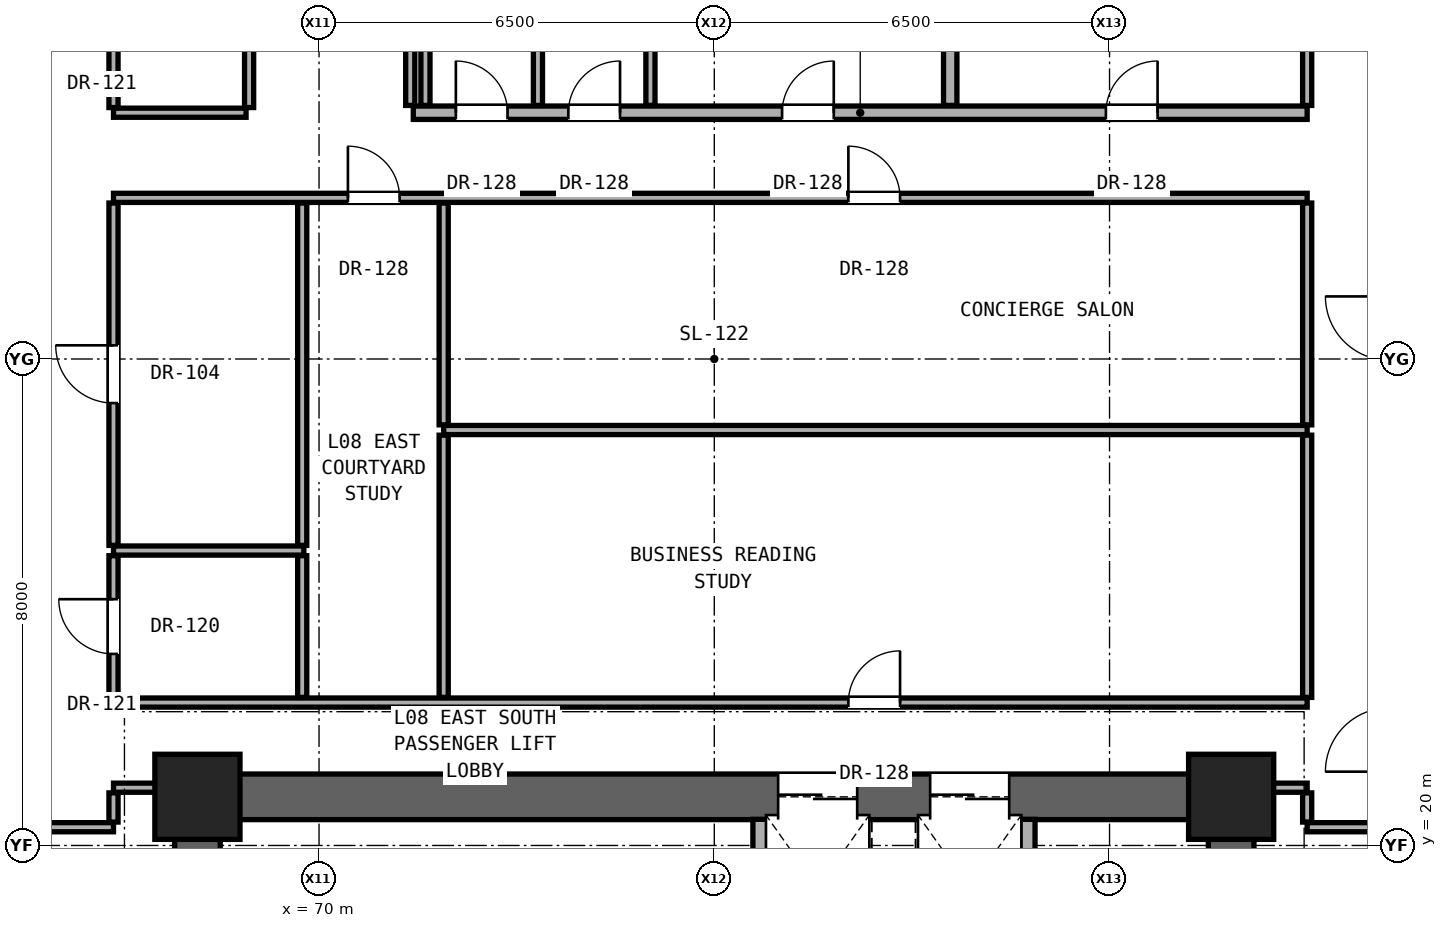
"""IFC4 building model, lengths in metres.
Left out: names, types, materials, properties, quantities, classifications, styles, units other than length and angle.
Written with IfcOpenShell. Run it as: python <this file> out.ifc"""

import sys

from ifc_helpers import new_model, si_unit, direction, frame, frame_2d, origin, origin_2d, place, context, subcontext, project, spatial, rectangle, extrude, element, fill, save


model = new_model("IFC4")
c1 = context("Model", 3, precision=1e-05, world=origin(), true_north=direction((0.0, 1.0)))
c2 = subcontext(c1, "Body", "Model", "MODEL_VIEW")
j1 = project(units=[si_unit("LENGTHUNIT", "METRE"), si_unit("PLANEANGLEUNIT", "RADIAN")], contexts=[c1])
p1 = place(None, origin())
s1 = spatial("IfcSite", under=j1, at=p1, CompositionType="ELEMENT")
p2 = place(p1, origin())
s2 = spatial("IfcBuilding", under=s1, at=p2, CompositionType="ELEMENT")
p3 = place(p2, frame((0.0, 0.0, 32.3)))
s3 = spatial("IfcBuildingStorey", under=s2, at=p3, CompositionType="ELEMENT", Elevation=32.3)
for number, where, z_axis, x_axis in (
    (1, (68.0, 20.8, 0.0), (0.0, 0.0, 1.0), (1.0, 0.0, 0.0)),
    (2, (85.0, 20.8, 0.0), (0.0, 0.0, 1.0), (1.0, 0.0, 0.0)),
):
    element("IfcColumn", number, at=place(p3, frame(where, z_axis=z_axis, x_axis=x_axis)), inside=s3, PredefinedType="COLUMN", context=c2, shape_type="SweptSolid", body=[
        extrude(rectangle(XDim=1.4, YDim=1.4, at=origin_2d()), origin(), (0.0, 0.0, 1.0), 3.3),
    ])
for number, where, z_axis, x_axis in (
    (3, (68.0, 15.2, 0.0), (0.0, 0.0, 1.0), (0.0, 1.0, 0.0)),
    (4, (85.0, 15.2, 0.0), (0.0, 0.0, 1.0), (0.0, 1.0, 0.0)),
):
    element("IfcWall", number, at=place(p3, frame(where, z_axis=z_axis, x_axis=x_axis)), inside=s3, PredefinedType="SHEAR", context=c2, shape_type="SweptSolid", body=[
        extrude(rectangle(XDim=5.6, YDim=0.75, at=frame_2d((2.8, 0.0))), origin(), (0.0, 0.0, 1.0), 3.06),
    ])
p4 = place(p3, frame((68.0, 20.8, 0.0), z_axis=(0.0, 0.0, 1.0), x_axis=(1.0, 0.0, 0.0)))
e5 = element("IfcWall", 5, at=p4, inside=s3, PredefinedType="SHEAR", context=c2, shape_type="SweptSolid", body=[
    extrude(rectangle(XDim=17.0, YDim=0.75, at=frame_2d((8.5, 0.0))), origin(), (0.0, 0.0, 1.0), 3.06),
])
p5 = place(p4, frame((9.55, 0.0, 0.0)))
e6 = element("IfcOpeningElement", 6, at=p5, cuts=e5, PredefinedType="OPENING", context=c2, shape_type="SweptSolid", body=[
    extrude(rectangle(XDim=1.3, YDim=2.3, at=frame_2d((0.65, 1.15))), frame((0.0, 0.385, 0.0), z_axis=(0.0, -1.0, 0.0), x_axis=(1.0, 0.0, 0.0)), (0.0, 0.0, 1.0), 0.77),
])
p6 = place(p4, frame((12.05, 0.0, 0.0)))
e7 = element("IfcOpeningElement", 7, at=p6, cuts=e5, PredefinedType="OPENING", context=c2, shape_type="SweptSolid", body=[
    extrude(rectangle(XDim=1.3, YDim=2.3, at=frame_2d((0.65, 1.15))), frame((0.0, 0.385, 0.0), z_axis=(0.0, -1.0, 0.0), x_axis=(1.0, 0.0, 0.0)), (0.0, 0.0, 1.0), 0.77),
])
p7 = place(p3, frame((65.25, 20.3, 0.0), z_axis=(0.0, 0.0, 1.0), x_axis=(1.0, 0.0, 0.0)))
e8 = element("IfcWall", 8, at=p7, inside=s3, PredefinedType="PARTITIONING", context=c2, shape_type="SweptSolid", body=[
    extrude(rectangle(XDim=1.37, YDim=0.15, at=frame_2d((0.685, 0.0))), origin(), (0.0, 0.0, 1.0), 3.06),
])
p8 = place(p3, frame((86.25, 20.3, 0.0), z_axis=(0.0, 0.0, 1.0), x_axis=(1.0, 0.0, 0.0)))
e9 = element("IfcWall", 9, at=p8, inside=s3, PredefinedType="PARTITIONING", context=c2, shape_type="SweptSolid", body=[
    extrude(rectangle(XDim=1.35, YDim=0.15, at=frame_2d((0.675, 0.0))), origin(), (0.0, 0.0, 1.0), 3.06),
])
p9 = place(p3, frame((66.62, 20.95, 0.0), z_axis=(0.0, 0.0, 1.0), x_axis=(1.0, 0.0, 0.0)))
e10 = element("IfcWall", 10, at=p9, inside=s3, PredefinedType="PARTITIONING", context=c2, shape_type="SweptSolid", body=[
    extrude(rectangle(XDim=1.01, YDim=0.15, at=frame_2d((0.505, 0.0))), origin(), (0.0, 0.0, 1.0), 2.452),
])
p10 = place(p3, frame((85.37, 20.95, 0.0), z_axis=(0.0, 0.0, 1.0), x_axis=(1.0, 0.0, 0.0)))
e11 = element("IfcWall", 11, at=p10, inside=s3, PredefinedType="PARTITIONING", context=c2, shape_type="SweptSolid", body=[
    extrude(rectangle(XDim=0.88, YDim=0.15, at=frame_2d((0.44, 0.0))), origin(), (0.0, 0.0, 1.0), 2.452),
])
p11 = place(p3, frame((66.62, 22.35, 0.0), z_axis=(0.0, 0.0, 1.0), x_axis=(1.0, 0.0, 0.0)))
e12 = element("IfcWall", 12, at=p11, inside=s3, PredefinedType="PARTITIONING", context=c2, shape_type="SweptSolid", body=[
    extrude(rectangle(XDim=19.63, YDim=0.15, at=frame_2d((9.815, 0.0))), origin(), (0.0, 0.0, 1.0), 2.125),
])
p12 = place(p11, frame((12.085, 0.0, 0.0)))
e13 = element("IfcOpeningElement", 13, at=p12, cuts=e12, PredefinedType="OPENING", context=c2, shape_type="SweptSolid", body=[
    extrude(rectangle(XDim=0.85, YDim=2.01, at=frame_2d((0.425, 1.005))), frame((0.0, 0.085, 0.0), z_axis=(0.0, -1.0, 0.0), x_axis=(1.0, 0.0, 0.0)), (0.0, 0.0, 1.0), 0.17),
])
p13 = place(p3, frame((66.62, 24.85, 0.0), z_axis=(0.0, 0.0, 1.0), x_axis=(1.0, 0.0, 0.0)))
e14 = element("IfcWall", 14, at=p13, inside=s3, PredefinedType="PARTITIONING", context=c2, shape_type="SweptSolid", body=[
    extrude(rectangle(XDim=3.13, YDim=0.15, at=frame_2d((1.565, 0.0))), origin(), (0.0, 0.0, 1.0), 2.125),
])
p14 = place(p3, frame((72.05, 26.832, 0.0), z_axis=(0.0, 0.0, 1.0), x_axis=(1.0, 0.0, 0.0)))
e15 = element("IfcWall", 15, at=p14, inside=s3, PredefinedType="PARTITIONING", context=c2, shape_type="SweptSolid", body=[
    extrude(rectangle(XDim=14.2, YDim=0.15, at=frame_2d((7.1, 0.0))), origin(), (0.0, 0.0, 1.0), 2.125),
])
p15 = place(p3, frame((66.62, 30.65, 0.0), z_axis=(0.0, 0.0, 1.0), x_axis=(1.0, 0.0, 0.0)))
e16 = element("IfcWall", 16, at=p15, inside=s3, PredefinedType="PARTITIONING", context=c2, shape_type="SweptSolid", body=[
    extrude(rectangle(XDim=19.63, YDim=0.15, at=frame_2d((9.815, 0.0))), origin(), (0.0, 0.0, 1.0), 2.125),
])
p16 = place(p15, frame((3.855, 0.0, 0.0)))
e17 = element("IfcOpeningElement", 17, at=p16, cuts=e16, PredefinedType="OPENING", context=c2, shape_type="SweptSolid", body=[
    extrude(rectangle(XDim=0.85, YDim=2.01, at=frame_2d((0.425, 1.005))), frame((0.0, 0.085, 0.0), z_axis=(0.0, -1.0, 0.0), x_axis=(1.0, 0.0, 0.0)), (0.0, 0.0, 1.0), 0.17),
])
p17 = place(p15, frame((12.085, 0.0, 0.0)))
e18 = element("IfcOpeningElement", 18, at=p17, cuts=e16, PredefinedType="OPENING", context=c2, shape_type="SweptSolid", body=[
    extrude(rectangle(XDim=0.85, YDim=2.01, at=frame_2d((0.425, 1.005))), frame((0.0, 0.085, 0.0), z_axis=(0.0, -1.0, 0.0), x_axis=(1.0, 0.0, 0.0)), (0.0, 0.0, 1.0), 0.17),
])
p18 = place(p3, frame((66.62, 32.05, 0.0), z_axis=(0.0, 0.0, 1.0), x_axis=(1.0, 0.0, 0.0)))
e19 = element("IfcWall", 19, at=p18, inside=s3, PredefinedType="PARTITIONING", context=c2, shape_type="SweptSolid", body=[
    extrude(rectangle(XDim=2.18, YDim=0.15, at=frame_2d((1.09, 0.0))), origin(), (0.0, 0.0, 1.0), 2.125),
])
p19 = place(p3, frame((71.55, 32.05, 0.0), z_axis=(0.0, 0.0, 1.0), x_axis=(1.0, 0.0, 0.0)))
e20 = element("IfcWall", 20, at=p19, inside=s3, PredefinedType="SOLIDWALL", context=c2, shape_type="SweptSolid", body=[
    extrude(rectangle(XDim=14.7, YDim=0.22, at=frame_2d((7.35, 0.0))), origin(), (0.0, 0.0, 1.0), 2.125),
])
p20 = place(p19, frame((11.39, 0.0, 0.0)))
e21 = element("IfcOpeningElement", 21, at=p20, cuts=e20, PredefinedType="OPENING", context=c2, shape_type="SweptSolid", body=[
    extrude(rectangle(XDim=0.85, YDim=2.01, at=frame_2d((0.425, 1.005))), frame((0.0, 0.12, 0.0), z_axis=(0.0, -1.0, 0.0), x_axis=(1.0, 0.0, 0.0)), (0.0, 0.0, 1.0), 0.24),
])
p21 = place(p19, frame((6.065, 0.0, 0.0)))
e22 = element("IfcOpeningElement", 22, at=p21, cuts=e20, PredefinedType="OPENING", context=c2, shape_type="SweptSolid", body=[
    extrude(rectangle(XDim=0.85, YDim=2.01, at=frame_2d((0.425, 1.005))), frame((0.0, 0.12, 0.0), z_axis=(0.0, -1.0, 0.0), x_axis=(1.0, 0.0, 0.0)), (0.0, 0.0, 1.0), 0.24),
])
p22 = place(p19, frame((0.7, 0.0, 0.0)))
e23 = element("IfcOpeningElement", 23, at=p22, cuts=e20, PredefinedType="OPENING", context=c2, shape_type="SweptSolid", body=[
    extrude(rectangle(XDim=0.85, YDim=2.01, at=frame_2d((0.425, 1.005))), frame((0.0, 0.12, 0.0), z_axis=(0.0, -1.0, 0.0), x_axis=(1.0, 0.0, 0.0)), (0.0, 0.0, 1.0), 0.24),
])
p23 = place(p19, frame((2.55, 0.0, 0.0)))
e24 = element("IfcOpeningElement", 24, at=p23, cuts=e20, PredefinedType="OPENING", context=c2, shape_type="SweptSolid", body=[
    extrude(rectangle(XDim=0.85, YDim=2.01, at=frame_2d((0.425, 1.005))), frame((0.0, 0.12, 0.0), z_axis=(0.0, -1.0, 0.0), x_axis=(1.0, 0.0, 0.0)), (0.0, 0.0, 1.0), 0.24),
])
p24 = place(p3, frame((66.62, 20.385, 0.0), z_axis=(0.0, 0.0, 1.0), x_axis=(0.0, 1.0, 0.0)))
e25 = element("IfcWall", 25, at=p24, inside=s3, PredefinedType="PARTITIONING", context=c2, shape_type="SweptSolid", body=[
    extrude(rectangle(XDim=0.48, YDim=0.15, at=frame_2d((0.24, 0.0))), origin(), (0.0, 0.0, 1.0), 2.452),
])
p25 = place(p3, frame((66.62, 22.435, 0.0), z_axis=(0.0, 0.0, 1.0), x_axis=(0.0, 1.0, 0.0)))
e26 = element("IfcWall", 26, at=p25, inside=s3, PredefinedType="PARTITIONING", context=c2, shape_type="SweptSolid", body=[
    extrude(rectangle(XDim=2.33, YDim=0.15, at=frame_2d((1.165, 0.0))), origin(), (0.0, 0.0, 1.0), 3.06),
])
p26 = place(p25, frame((0.715, 0.0, 0.0)))
e27 = element("IfcOpeningElement", 27, at=p26, cuts=e26, PredefinedType="OPENING", context=c2, shape_type="SweptSolid", body=[
    extrude(rectangle(XDim=0.9, YDim=2.1, at=frame_2d((0.45, 1.05))), frame((0.0, 0.085, 0.0), z_axis=(0.0, -1.0, 0.0), x_axis=(1.0, 0.0, 0.0)), (0.0, 0.0, 1.0), 0.17),
])
p27 = place(p3, frame((66.62, 24.935, 0.0), z_axis=(0.0, 0.0, 1.0), x_axis=(0.0, 1.0, 0.0)))
e28 = element("IfcWall", 28, at=p27, inside=s3, PredefinedType="PARTITIONING", context=c2, shape_type="SweptSolid", body=[
    extrude(rectangle(XDim=5.63, YDim=0.15, at=frame_2d((2.815, 0.0))), origin(), (0.0, 0.0, 1.0), 2.279),
])
p28 = place(p27, frame((2.34, 0.0, 0.0)))
e29 = element("IfcOpeningElement", 29, at=p28, cuts=e28, PredefinedType="OPENING", context=c2, shape_type="SweptSolid", body=[
    extrude(rectangle(XDim=0.95, YDim=2.15, at=frame_2d((0.475, 1.075))), frame((0.0, 0.085, 0.0), z_axis=(0.0, -1.0, 0.0), x_axis=(1.0, 0.0, 0.0)), (0.0, 0.0, 1.0), 0.17),
])
p29 = place(p3, frame((66.62, 32.135, 0.0), z_axis=(0.0, 0.0, 1.0), x_axis=(0.0, 1.0, 0.0)))
e30 = element("IfcWall", 30, at=p29, inside=s3, PredefinedType="PARTITIONING", context=c2, shape_type="SweptSolid", body=[
    extrude(rectangle(XDim=3.48, YDim=0.15, at=frame_2d((1.74, 0.0))), origin(), (0.0, 0.0, 1.0), 2.452),
])
p30 = place(p3, frame((68.85, 32.135, 0.0), z_axis=(0.0, 0.0, 1.0), x_axis=(0.0, 1.0, 0.0)))
e31 = element("IfcWall", 31, at=p30, inside=s3, PredefinedType="PARTITIONING", context=c2, shape_type="SweptSolid", body=[
    extrude(rectangle(XDim=2.695, YDim=0.15, at=frame_2d((1.348, 0.0))), origin(), (0.0, 0.0, 1.0), 3.06),
])
p31 = place(p3, frame((69.723, 22.435, 0.0), z_axis=(0.0, 0.0, 1.0), x_axis=(0.0, 1.0, 0.0)))
e32 = element("IfcWall", 32, at=p31, inside=s3, PredefinedType="PARTITIONING", context=c2, shape_type="SweptSolid", body=[
    extrude(rectangle(XDim=2.33, YDim=0.15, at=frame_2d((1.165, 0.0))), origin(), (0.0, 0.0, 1.0), 3.06),
])
p32 = place(p3, frame((69.723, 24.935, 0.0), z_axis=(0.0, 0.0, 1.0), x_axis=(0.0, 1.0, 0.0)))
e33 = element("IfcWall", 33, at=p32, inside=s3, PredefinedType="PARTITIONING", context=c2, shape_type="SweptSolid", body=[
    extrude(rectangle(XDim=5.63, YDim=0.15, at=frame_2d((2.815, 0.0))), origin(), (0.0, 0.0, 1.0), 2.125),
])
for number, where, z_axis, x_axis in (
    (34, (71.5, 32.17, 0.0), (0.0, 0.0, 1.0), (0.0, 1.0, 0.0)),
    (35, (71.75, 32.17, 0.0), (0.0, 0.0, 1.0), (0.0, 1.0, 0.0)),
):
    element("IfcWall", number, at=place(p3, frame(where, z_axis=z_axis, x_axis=x_axis)), inside=s3, PredefinedType="PARTITIONING", context=c2, shape_type="SweptSolid", body=[
        extrude(rectangle(XDim=2.66, YDim=0.15, at=frame_2d((1.33, 0.0))), origin(), (0.0, 0.0, 1.0), 3.06),
    ])
p33 = place(p3, frame((72.05, 22.435, 0.0), z_axis=(0.0, 0.0, 1.0), x_axis=(0.0, 1.0, 0.0)))
e36 = element("IfcWall", 36, at=p33, inside=s3, PredefinedType="PARTITIONING", context=c2, shape_type="SweptSolid", body=[
    extrude(rectangle(XDim=4.312, YDim=0.15, at=frame_2d((2.156, 0.0))), origin(), (0.0, 0.0, 1.0), 2.589),
])
p34 = place(p3, frame((72.05, 26.917, 0.0), z_axis=(0.0, 0.0, 1.0), x_axis=(0.0, 1.0, 0.0)))
e37 = element("IfcWall", 37, at=p34, inside=s3, PredefinedType="PARTITIONING", context=c2, shape_type="SweptSolid", body=[
    extrude(rectangle(XDim=3.648, YDim=0.15, at=frame_2d((1.824, 0.0))), origin(), (0.0, 0.0, 1.0), 2.125),
])
for number, where, z_axis, x_axis in (
    (38, (73.6, 32.17, 0.0), (0.0, 0.0, 1.0), (0.0, 1.0, 0.0)),
    (39, (75.45, 32.17, 0.0), (0.0, 0.0, 1.0), (0.0, 1.0, 0.0)),
):
    element("IfcWall", number, at=place(p3, frame(where, z_axis=z_axis, x_axis=x_axis)), inside=s3, PredefinedType="PARTITIONING", context=c2, shape_type="SweptSolid", body=[
        extrude(rectangle(XDim=2.66, YDim=0.15, at=frame_2d((1.33, 0.0))), origin(), (0.0, 0.0, 1.0), 3.06),
    ])
p35 = place(p3, frame((77.26, 18.735, 0.0), z_axis=(0.0, 0.0, 1.0), x_axis=(0.0, 1.0, 0.0)))
e40 = element("IfcWall", 40, at=p35, inside=s3, PredefinedType="SOLIDWALL", context=c2, shape_type="SweptSolid", body=[
    extrude(rectangle(XDim=1.695, YDim=0.25, at=frame_2d((0.847, 0.0))), origin(), (0.0, 0.0, 1.0), 3.06),
])
p36 = place(p3, frame((80.38, 32.17, 0.0), z_axis=(0.0, 0.0, 1.0), x_axis=(0.0, 1.0, 0.0)))
e41 = element("IfcWall", 41, at=p36, inside=s3, PredefinedType="SOLIDWALL", context=c2, shape_type="SweptSolid", body=[
    extrude(rectangle(XDim=2.66, YDim=0.22, at=frame_2d((1.33, 0.0))), origin(), (0.0, 0.0, 1.0), 3.06),
])
p37 = place(p3, frame((81.65, 18.185, 0.0), z_axis=(0.0, 0.0, 1.0), x_axis=(0.0, 1.0, 0.0)))
e42 = element("IfcWall", 42, at=p37, inside=s3, PredefinedType="SOLIDWALL", context=c2, shape_type="SweptSolid", body=[
    extrude(rectangle(XDim=2.245, YDim=0.25, at=frame_2d((1.123, 0.0))), origin(), (0.0, 0.0, 1.0), 3.06),
])
p38 = place(p3, frame((86.25, 20.385, 0.0), z_axis=(0.0, 0.0, 1.0), x_axis=(0.0, 1.0, 0.0)))
e43 = element("IfcWall", 43, at=p38, inside=s3, PredefinedType="PARTITIONING", context=c2, shape_type="SweptSolid", body=[
    extrude(rectangle(XDim=0.48, YDim=0.15, at=frame_2d((0.24, 0.0))), origin(), (0.0, 0.0, 1.0), 2.452),
])
p39 = place(p3, frame((86.25, 22.435, 0.0), z_axis=(0.0, 0.0, 1.0), x_axis=(0.0, 1.0, 0.0)))
e44 = element("IfcWall", 44, at=p39, inside=s3, PredefinedType="PARTITIONING", context=c2, shape_type="SweptSolid", body=[
    extrude(rectangle(XDim=4.312, YDim=0.15, at=frame_2d((2.156, 0.0))), origin(), (0.0, 0.0, 1.0), 3.06),
])
p40 = place(p3, frame((86.25, 26.917, 0.0), z_axis=(0.0, 0.0, 1.0), x_axis=(0.0, 1.0, 0.0)))
e45 = element("IfcWall", 45, at=p40, inside=s3, PredefinedType="PARTITIONING", context=c2, shape_type="SweptSolid", body=[
    extrude(rectangle(XDim=3.648, YDim=0.15, at=frame_2d((1.824, 0.0))), origin(), (0.0, 0.0, 1.0), 2.279),
])
p41 = place(p3, frame((86.25, 32.17, 0.0), z_axis=(0.0, 0.0, 1.0), x_axis=(0.0, 1.0, 0.0)))
e46 = element("IfcWall", 46, at=p41, inside=s3, PredefinedType="PARTITIONING", context=c2, shape_type="SweptSolid", body=[
    extrude(rectangle(XDim=2.795, YDim=0.15, at=frame_2d((1.397, 0.0))), origin(), (0.0, 0.0, 1.0), 2.452),
])
p42 = place(p20, origin())
e47 = element("IfcDoor", 47, at=p42, inside=s3, OperationType="SINGLE_SWING_RIGHT", PredefinedType="DOOR", context=c2, shape_type="SweptSolid", body=[
    extrude(rectangle(XDim=0.85, YDim=2.01, at=frame_2d((0.425, 1.005))), frame((0.0, 0.025, 0.0), z_axis=(0.0, -1.0, 0.0), x_axis=(1.0, 0.0, 0.0)), (0.0, 0.0, 1.0), 0.05),
])
fill(e21, e47)
p43 = place(p21, origin())
e48 = element("IfcDoor", 48, at=p43, inside=s3, OperationType="SINGLE_SWING_RIGHT", PredefinedType="DOOR", context=c2, shape_type="SweptSolid", body=[
    extrude(rectangle(XDim=0.85, YDim=2.01, at=frame_2d((0.425, 1.005))), frame((0.0, 0.025, 0.0), z_axis=(0.0, -1.0, 0.0), x_axis=(1.0, 0.0, 0.0)), (0.0, 0.0, 1.0), 0.05),
])
fill(e22, e48)
p44 = place(p22, origin())
e49 = element("IfcDoor", 49, at=p44, inside=s3, OperationType="SINGLE_SWING_LEFT", PredefinedType="DOOR", context=c2, shape_type="SweptSolid", body=[
    extrude(rectangle(XDim=0.85, YDim=2.01, at=frame_2d((0.425, 1.005))), frame((0.0, 0.025, 0.0), z_axis=(0.0, -1.0, 0.0), x_axis=(1.0, 0.0, 0.0)), (0.0, 0.0, 1.0), 0.05),
])
fill(e23, e49)
p45 = place(p23, origin())
e50 = element("IfcDoor", 50, at=p45, inside=s3, OperationType="SINGLE_SWING_RIGHT", PredefinedType="DOOR", context=c2, shape_type="SweptSolid", body=[
    extrude(rectangle(XDim=0.85, YDim=2.01, at=frame_2d((0.425, 1.005))), frame((0.0, 0.025, 0.0), z_axis=(0.0, -1.0, 0.0), x_axis=(1.0, 0.0, 0.0)), (0.0, 0.0, 1.0), 0.05),
])
fill(e24, e50)
p46 = place(p26, origin())
e51 = element("IfcDoor", 51, at=p46, inside=s3, OperationType="SINGLE_SWING_RIGHT", PredefinedType="DOOR", context=c2, shape_type="SweptSolid", body=[
    extrude(rectangle(XDim=0.9, YDim=2.1, at=frame_2d((0.45, 1.05))), frame((0.0, 0.025, 0.0), z_axis=(0.0, -1.0, 0.0), x_axis=(1.0, 0.0, 0.0)), (0.0, 0.0, 1.0), 0.05),
])
fill(e27, e51)
p47 = place(p28, origin())
e52 = element("IfcDoor", 52, at=p47, inside=s3, OperationType="SINGLE_SWING_RIGHT", PredefinedType="DOOR", context=c2, shape_type="SweptSolid", body=[
    extrude(rectangle(XDim=0.95, YDim=2.15, at=frame_2d((0.475, 1.075))), frame((0.0, 0.025, 0.0), z_axis=(0.0, -1.0, 0.0), x_axis=(1.0, 0.0, 0.0)), (0.0, 0.0, 1.0), 0.05),
])
fill(e29, e52)
p48 = place(p16, origin())
e53 = element("IfcDoor", 53, at=p48, inside=s3, OperationType="SINGLE_SWING_LEFT", PredefinedType="DOOR", context=c2, shape_type="SweptSolid", body=[
    extrude(rectangle(XDim=0.85, YDim=2.01, at=frame_2d((0.425, 1.005))), frame((0.0, 0.025, 0.0), z_axis=(0.0, -1.0, 0.0), x_axis=(1.0, 0.0, 0.0)), (0.0, 0.0, 1.0), 0.05),
])
fill(e17, e53)
p49 = place(p12, origin())
e54 = element("IfcDoor", 54, at=p49, inside=s3, OperationType="SINGLE_SWING_RIGHT", PredefinedType="DOOR", context=c2, shape_type="SweptSolid", body=[
    extrude(rectangle(XDim=0.85, YDim=2.01, at=frame_2d((0.425, 1.005))), frame((0.0, 0.025, 0.0), z_axis=(0.0, -1.0, 0.0), x_axis=(1.0, 0.0, 0.0)), (0.0, 0.0, 1.0), 0.05),
])
fill(e13, e54)
p50 = place(p17, origin())
e55 = element("IfcDoor", 55, at=p50, inside=s3, OperationType="SINGLE_SWING_LEFT", PredefinedType="DOOR", context=c2, shape_type="SweptSolid", body=[
    extrude(rectangle(XDim=0.85, YDim=2.01, at=frame_2d((0.425, 1.005))), frame((0.0, 0.025, 0.0), z_axis=(0.0, -1.0, 0.0), x_axis=(1.0, 0.0, 0.0)), (0.0, 0.0, 1.0), 0.05),
])
fill(e18, e55)
p51 = place(p5, origin())
e56 = element("IfcDoor", 56, at=p51, inside=s3, OperationType="DOUBLE_DOOR_SLIDING", PredefinedType="DOOR", context=c2, shape_type="SweptSolid", body=[
    extrude(rectangle(XDim=1.3, YDim=2.3, at=frame_2d((0.65, 1.15))), frame((0.0, 0.025, 0.0), z_axis=(0.0, -1.0, 0.0), x_axis=(1.0, 0.0, 0.0)), (0.0, 0.0, 1.0), 0.05),
])
fill(e6, e56)
p52 = place(p6, origin())
e57 = element("IfcDoor", 57, at=p52, inside=s3, OperationType="DOUBLE_DOOR_SLIDING", PredefinedType="DOOR", context=c2, shape_type="SweptSolid", body=[
    extrude(rectangle(XDim=1.3, YDim=2.3, at=frame_2d((0.65, 1.15))), frame((0.0, 0.025, 0.0), z_axis=(0.0, -1.0, 0.0), x_axis=(1.0, 0.0, 0.0)), (0.0, 0.0, 1.0), 0.05),
])
fill(e7, e57)
save(model, sys.argv[1])
